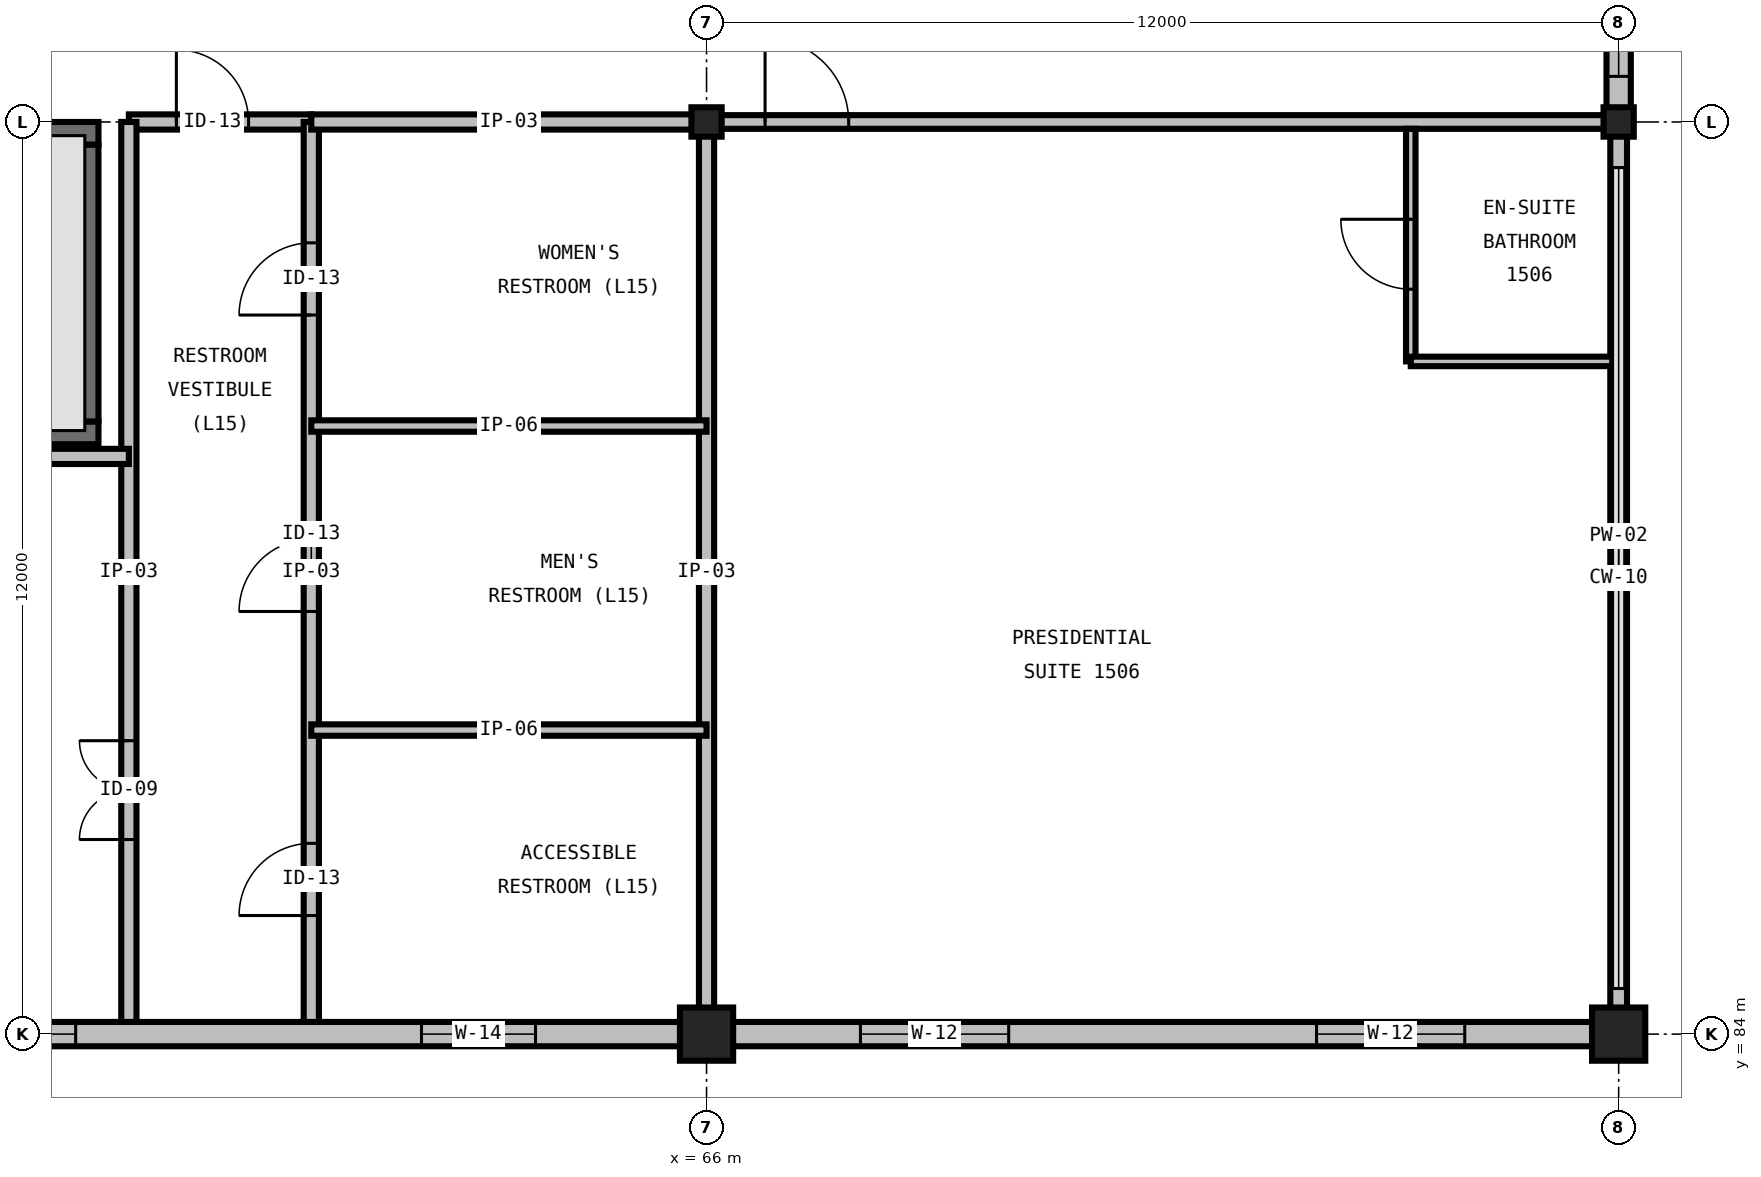
"""IFC4 building model, lengths in metres.
Left out: names, types, materials, properties, quantities, classifications, styles, units other than length and angle.
Written with IfcOpenShell. Run it as: python <this file> out.ifc"""

import sys

from ifc_helpers import new_model, si_unit, direction, frame, frame_2d, origin, origin_2d, place, context, subcontext, project, spatial, rectangle, i_section, extrude, element, fill, save


model = new_model("IFC4")
c1 = context("Model", 3, precision=1e-05, world=origin(), true_north=direction((0.0, 1.0)))
c2 = subcontext(c1, "Body", "Model", "MODEL_VIEW")
j1 = project(units=[si_unit("LENGTHUNIT", "METRE"), si_unit("PLANEANGLEUNIT", "RADIAN")], contexts=[c1])
p1 = place(None, origin())
s1 = spatial("IfcSite", under=j1, at=p1, CompositionType="ELEMENT")
p2 = place(p1, origin())
s2 = spatial("IfcBuilding", under=s1, at=p2, CompositionType="ELEMENT")
p3 = place(p2, frame((0.0, 0.0, 63.6)))
s3 = spatial("IfcBuildingStorey", under=s2, at=p3, CompositionType="ELEMENT", Elevation=63.6)
p4 = place(p3, frame((66.0, 84.0, 0.0), z_axis=(0.0, 0.0, 1.0), x_axis=(1.0, 0.0, 0.0)))
e1 = element("IfcColumn", 1, at=p4, inside=s3, PredefinedType="COLUMN", context=c2, shape_type="SweptSolid", body=[
    extrude(rectangle(XDim=0.7, YDim=0.7, at=origin_2d()), origin(), (0.0, 0.0, 1.0), 3.6),
])
p5 = place(p3, frame((66.0, 96.0, 0.0), z_axis=(0.0, 0.0, 1.0), x_axis=(1.0, 0.0, 0.0)))
e2 = element("IfcColumn", 2, at=p5, inside=s3, PredefinedType="COLUMN", context=c2, shape_type="SweptSolid", body=[
    extrude(i_section(OverallWidth=0.398, OverallDepth=0.387, WebThickness=0.021, FlangeThickness=0.033, FilletRadius=0.031, at=origin_2d()), origin(), (0.0, 0.0, 1.0), 3.6),
])
p6 = place(p3, frame((78.0, 84.0, 0.0), z_axis=(0.0, 0.0, 1.0), x_axis=(1.0, 0.0, 0.0)))
e3 = element("IfcColumn", 3, at=p6, inside=s3, PredefinedType="COLUMN", context=c2, shape_type="SweptSolid", body=[
    extrude(rectangle(XDim=0.7, YDim=0.7, at=origin_2d()), origin(), (0.0, 0.0, 1.0), 3.6),
])
p7 = place(p3, frame((78.0, 96.0, 0.0), z_axis=(0.0, 0.0, 1.0), x_axis=(1.0, 0.0, 0.0)))
e4 = element("IfcColumn", 4, at=p7, inside=s3, PredefinedType="COLUMN", context=c2, shape_type="SweptSolid", body=[
    extrude(i_section(OverallWidth=0.398, OverallDepth=0.387, WebThickness=0.021, FlangeThickness=0.033, FilletRadius=0.031, at=origin_2d()), origin(), (0.0, 0.0, 1.0), 3.6),
])
p8 = place(p3, frame((48.2, 91.91, 0.0), z_axis=(0.0, 0.0, 1.0), x_axis=(1.0, 0.0, 0.0)))
e5 = element("IfcWall", 5, at=p8, inside=s3, PredefinedType="SHEAR", context=c2, shape_type="SweptSolid", body=[
    extrude(rectangle(XDim=9.8, YDim=0.3, at=frame_2d((4.9, 0.0))), origin(), (0.0, 0.0, 1.0), 3.6),
])
p9 = place(p3, frame((58.0, 95.85, 0.0), z_axis=(0.0, 0.0, 1.0), x_axis=(-1.0, 0.0, 0.0)))
e6 = element("IfcWall", 6, at=p9, inside=s3, PredefinedType="SHEAR", context=c2, shape_type="SweptSolid", body=[
    extrude(rectangle(XDim=9.8, YDim=0.3, at=frame_2d((4.9, 0.0))), origin(), (0.0, 0.0, 1.0), 3.6),
])
p10 = place(p9, frame((8.25, 0.0, 0.0)))
e7 = element("IfcOpeningElement", 7, at=p10, cuts=e6, PredefinedType="OPENING", context=c2, shape_type="SweptSolid", body=[
    extrude(rectangle(XDim=1.1, YDim=2.2, at=frame_2d((0.55, 1.1))), frame((0.0, 0.165, 0.0), z_axis=(0.0, -1.0, 0.0), x_axis=(1.0, 0.0, 0.0)), (0.0, 0.0, 1.0), 0.33),
])
p11 = place(p3, frame((57.85, 92.06, 0.0), z_axis=(0.0, 0.0, 1.0), x_axis=(0.0, 1.0, 0.0)))
e8 = element("IfcWall", 8, at=p11, inside=s3, PredefinedType="SHEAR", context=c2, shape_type="SweptSolid", body=[
    extrude(rectangle(XDim=3.64, YDim=0.3, at=frame_2d((1.82, 0.0))), origin(), (0.0, 0.0, 1.0), 3.6),
])
p12 = place(p3, frame((54.0, 84.0, 0.0), z_axis=(0.0, 0.0, 1.0), x_axis=(1.0, 0.0, 0.0)))
e9 = element("IfcWall", 9, at=p12, inside=s3, PredefinedType="STANDARD", context=c2, shape_type="SweptSolid", body=[
    extrude(rectangle(XDim=12.0, YDim=0.32, at=frame_2d((6.0, 0.0))), origin(), (0.0, 0.0, 1.0), 2.536),
])
p13 = place(p12, frame((2.3, 0.0, 1.0)))
e10 = element("IfcOpeningElement", 10, at=p13, cuts=e9, PredefinedType="OPENING", context=c2, shape_type="SweptSolid", body=[
    extrude(rectangle(XDim=1.4, YDim=1.4, at=frame_2d((0.7, 0.7))), frame((0.0, 0.175, 0.0), z_axis=(0.0, -1.0, 0.0), x_axis=(1.0, 0.0, 0.0)), (0.0, 0.0, 1.0), 0.35),
])
p14 = place(p12, frame((8.25, 0.0, 1.0)))
e11 = element("IfcOpeningElement", 11, at=p14, cuts=e9, PredefinedType="OPENING", context=c2, shape_type="SweptSolid", body=[
    extrude(rectangle(XDim=1.5, YDim=1.35, at=frame_2d((0.75, 0.675))), frame((0.0, 0.175, 0.0), z_axis=(0.0, -1.0, 0.0), x_axis=(1.0, 0.0, 0.0)), (0.0, 0.0, 1.0), 0.35),
])
p15 = place(p3, frame((66.0, 84.0, 0.0), z_axis=(0.0, 0.0, 1.0), x_axis=(1.0, 0.0, 0.0)))
e12 = element("IfcWall", 12, at=p15, inside=s3, PredefinedType="STANDARD", context=c2, shape_type="SweptSolid", body=[
    extrude(rectangle(XDim=12.0, YDim=0.32, at=frame_2d((6.0, 0.0))), origin(), (0.0, 0.0, 1.0), 2.536),
])
p16 = place(p15, frame((2.025, 0.0, 0.65)))
e13 = element("IfcOpeningElement", 13, at=p16, cuts=e12, PredefinedType="OPENING", context=c2, shape_type="SweptSolid", body=[
    extrude(rectangle(XDim=1.95, YDim=1.55, at=frame_2d((0.975, 0.775))), frame((0.0, 0.175, 0.0), z_axis=(0.0, -1.0, 0.0), x_axis=(1.0, 0.0, 0.0)), (0.0, 0.0, 1.0), 0.35),
])
p17 = place(p15, frame((8.025, 0.0, 0.65)))
e14 = element("IfcOpeningElement", 14, at=p17, cuts=e12, PredefinedType="OPENING", context=c2, shape_type="SweptSolid", body=[
    extrude(rectangle(XDim=1.95, YDim=1.55, at=frame_2d((0.975, 0.775))), frame((0.0, 0.175, 0.0), z_axis=(0.0, -1.0, 0.0), x_axis=(1.0, 0.0, 0.0)), (0.0, 0.0, 1.0), 0.35),
])
p18 = place(p3, frame((78.0, 84.0, 0.0), z_axis=(0.0, 0.0, 1.0), x_axis=(0.0, 1.0, 0.0)))
e15 = element("IfcWall", 15, at=p18, inside=s3, PredefinedType="PARAPET", context=c2, shape_type="SweptSolid", body=[
    extrude(rectangle(XDim=12.0, YDim=0.22, at=frame_2d((6.0, 0.0))), origin(), (0.0, 0.0, 1.0), 0.2),
])
p19 = place(p3, frame((78.0, 96.0, 0.0), z_axis=(0.0, 0.0, 1.0), x_axis=(0.0, 1.0, 0.0)))
e16 = element("IfcWall", 16, at=p19, inside=s3, PredefinedType="STANDARD", context=c2, shape_type="SweptSolid", body=[
    extrude(rectangle(XDim=9.0, YDim=0.32, at=frame_2d((4.5, 0.0))), origin(), (0.0, 0.0, 1.0), 2.981),
])
p20 = place(p19, frame((0.6, 0.0, 0.85)))
e17 = element("IfcOpeningElement", 17, at=p20, cuts=e16, PredefinedType="OPENING", context=c2, shape_type="SweptSolid", body=[
    extrude(rectangle(XDim=1.8, YDim=1.5, at=frame_2d((0.9, 0.75))), frame((0.0, 0.175, 0.0), z_axis=(0.0, -1.0, 0.0), x_axis=(1.0, 0.0, 0.0)), (0.0, 0.0, 1.0), 0.35),
])
p21 = place(p3, frame((58.4, 96.0, 0.0), z_axis=(0.0, 0.0, 1.0), x_axis=(1.0, 0.0, 0.0)))
e18 = element("IfcWall", 18, at=p21, inside=s3, PredefinedType="PARTITIONING", context=c2, shape_type="SweptSolid", body=[
    extrude(rectangle(XDim=2.4, YDim=0.2, at=frame_2d((1.2, 0.0))), origin(), (0.0, 0.0, 1.0), 2.359),
])
p22 = place(p21, frame((0.625, 0.0, 0.0)))
e19 = element("IfcOpeningElement", 19, at=p22, cuts=e18, PredefinedType="OPENING", context=c2, shape_type="SweptSolid", body=[
    extrude(rectangle(XDim=0.95, YDim=2.15, at=frame_2d((0.475, 1.075))), frame((0.0, 0.115, 0.0), z_axis=(0.0, -1.0, 0.0), x_axis=(1.0, 0.0, 0.0)), (0.0, 0.0, 1.0), 0.23),
])
p23 = place(p3, frame((58.4, 84.16, 0.0), z_axis=(0.0, 0.0, 1.0), x_axis=(0.0, 1.0, 0.0)))
e20 = element("IfcWall", 20, at=p23, inside=s3, PredefinedType="PARTITIONING", context=c2, shape_type="SweptSolid", body=[
    extrude(rectangle(XDim=11.84, YDim=0.2, at=frame_2d((5.92, 0.0))), origin(), (0.0, 0.0, 1.0), 3.29),
])
p24 = place(p23, frame((2.4, 0.0, 0.0)))
e21 = element("IfcOpeningElement", 21, at=p24, cuts=e20, PredefinedType="OPENING", context=c2, shape_type="SweptSolid", body=[
    extrude(rectangle(XDim=1.3, YDim=2.2, at=frame_2d((0.65, 1.1))), frame((0.0, 0.115, 0.0), z_axis=(0.0, -1.0, 0.0), x_axis=(1.0, 0.0, 0.0)), (0.0, 0.0, 1.0), 0.23),
])
p25 = place(p3, frame((60.8, 84.16, 0.0), z_axis=(0.0, 0.0, 1.0), x_axis=(0.0, 1.0, 0.0)))
e22 = element("IfcWall", 22, at=p25, inside=s3, PredefinedType="PARTITIONING", context=c2, shape_type="SweptSolid", body=[
    extrude(rectangle(XDim=11.84, YDim=0.2, at=frame_2d((5.92, 0.0))), origin(), (0.0, 0.0, 1.0), 3.29),
])
p26 = place(p25, frame((1.4, 0.0, 0.0)))
e23 = element("IfcOpeningElement", 23, at=p26, cuts=e22, PredefinedType="OPENING", context=c2, shape_type="SweptSolid", body=[
    extrude(rectangle(XDim=0.95, YDim=2.15, at=frame_2d((0.475, 1.075))), frame((0.0, 0.115, 0.0), z_axis=(0.0, -1.0, 0.0), x_axis=(1.0, 0.0, 0.0)), (0.0, 0.0, 1.0), 0.23),
])
p27 = place(p25, frame((5.4, 0.0, 0.0)))
e24 = element("IfcOpeningElement", 24, at=p27, cuts=e22, PredefinedType="OPENING", context=c2, shape_type="SweptSolid", body=[
    extrude(rectangle(XDim=0.95, YDim=2.15, at=frame_2d((0.475, 1.075))), frame((0.0, 0.115, 0.0), z_axis=(0.0, -1.0, 0.0), x_axis=(1.0, 0.0, 0.0)), (0.0, 0.0, 1.0), 0.23),
])
p28 = place(p25, frame((9.3, 0.0, 0.0)))
e25 = element("IfcOpeningElement", 25, at=p28, cuts=e22, PredefinedType="OPENING", context=c2, shape_type="SweptSolid", body=[
    extrude(rectangle(XDim=0.95, YDim=2.15, at=frame_2d((0.475, 1.075))), frame((0.0, 0.115, 0.0), z_axis=(0.0, -1.0, 0.0), x_axis=(1.0, 0.0, 0.0)), (0.0, 0.0, 1.0), 0.23),
])
p29 = place(p3, frame((66.0, 84.16, 0.0), z_axis=(0.0, 0.0, 1.0), x_axis=(0.0, 1.0, 0.0)))
e26 = element("IfcWall", 26, at=p29, inside=s3, PredefinedType="PARTITIONING", context=c2, shape_type="SweptSolid", body=[
    extrude(rectangle(XDim=11.84, YDim=0.2, at=frame_2d((5.92, 0.0))), origin(), (0.0, 0.0, 1.0), 2.59),
])
p30 = place(p3, frame((60.8, 96.0, 0.0), z_axis=(0.0, 0.0, 1.0), x_axis=(1.0, 0.0, 0.0)))
e27 = element("IfcWall", 27, at=p30, inside=s3, PredefinedType="PARTITIONING", context=c2, shape_type="SweptSolid", body=[
    extrude(rectangle(XDim=5.2, YDim=0.2, at=frame_2d((2.6, 0.0))), origin(), (0.0, 0.0, 1.0), 2.359),
])
for number, where, z_axis, x_axis in (
    (28, (60.8, 88.0, 0.0), (0.0, 0.0, 1.0), (1.0, 0.0, 0.0)),
    (29, (60.8, 92.0, 0.0), (0.0, 0.0, 1.0), (1.0, 0.0, 0.0)),
):
    element("IfcWall", number, at=place(p3, frame(where, z_axis=z_axis, x_axis=x_axis)), inside=s3, PredefinedType="PARTITIONING", context=c2, shape_type="SweptSolid", body=[
        extrude(rectangle(XDim=5.2, YDim=0.15, at=frame_2d((2.6, 0.0))), origin(), (0.0, 0.0, 1.0), 3.29),
    ])
p31 = place(p3, frame((48.0, 91.6, 0.0), z_axis=(0.0, 0.0, 1.0), x_axis=(1.0, 0.0, 0.0)))
e30 = element("IfcWall", 30, at=p31, inside=s3, PredefinedType="PARTITIONING", context=c2, shape_type="SweptSolid", body=[
    extrude(rectangle(XDim=10.4, YDim=0.2, at=frame_2d((5.2, 0.0))), origin(), (0.0, 0.0, 1.0), 3.29),
])
p32 = place(p3, frame((66.0, 96.0, 0.0), z_axis=(0.0, 0.0, 1.0), x_axis=(1.0, 0.0, 0.0)))
e31 = element("IfcWall", 31, at=p32, inside=s3, PredefinedType="PARTITIONING", context=c2, shape_type="SweptSolid", body=[
    extrude(rectangle(XDim=11.915, YDim=0.18, at=frame_2d((5.957, 0.0))), origin(), (0.0, 0.0, 1.0), 2.664),
])
p33 = place(p32, frame((0.77, 0.0, 0.0)))
e32 = element("IfcOpeningElement", 32, at=p33, cuts=e31, PredefinedType="OPENING", context=c2, shape_type="SweptSolid", body=[
    extrude(rectangle(XDim=1.1, YDim=2.2, at=frame_2d((0.55, 1.1))), frame((0.0, 0.105, 0.0), z_axis=(0.0, -1.0, 0.0), x_axis=(1.0, 0.0, 0.0)), (0.0, 0.0, 1.0), 0.21),
])
p34 = place(p3, frame((75.265, 92.85, 0.0), z_axis=(0.0, 0.0, 1.0), x_axis=(0.0, 1.0, 0.0)))
e33 = element("IfcWall", 33, at=p34, inside=s3, PredefinedType="PARTITIONING", context=c2, shape_type="SweptSolid", body=[
    extrude(rectangle(XDim=3.06, YDim=0.125, at=frame_2d((1.53, 0.0))), origin(), (0.0, 0.0, 1.0), 3.29),
])
p35 = place(p34, frame((0.95, 0.0, 0.0)))
e34 = element("IfcOpeningElement", 34, at=p35, cuts=e33, PredefinedType="OPENING", context=c2, shape_type="SweptSolid", body=[
    extrude(rectangle(XDim=0.92, YDim=2.1, at=frame_2d((0.46, 1.05))), frame((0.0, 0.077, 0.0), z_axis=(0.0, -1.0, 0.0), x_axis=(1.0, 0.0, 0.0)), (0.0, 0.0, 1.0), 0.155),
])
p36 = place(p3, frame((75.265, 92.85, 0.0), z_axis=(0.0, 0.0, 1.0), x_axis=(1.0, 0.0, 0.0)))
e35 = element("IfcWall", 35, at=p36, inside=s3, PredefinedType="PARTITIONING", context=c2, shape_type="SweptSolid", body=[
    extrude(rectangle(XDim=2.65, YDim=0.125, at=frame_2d((1.325, 0.0))), origin(), (0.0, 0.0, 1.0), 3.29),
])
p37 = place(p13, origin())
e36 = element("IfcWindow", 36, at=p37, inside=s3, PartitioningType="SINGLE_PANEL", PredefinedType="WINDOW", context=c2, shape_type="SweptSolid", body=[
    extrude(rectangle(XDim=1.4, YDim=1.4, at=frame_2d((0.7, 0.7))), frame((0.0, 0.03, 0.0), z_axis=(0.0, -1.0, 0.0), x_axis=(1.0, 0.0, 0.0)), (0.0, 0.0, 1.0), 0.06),
])
fill(e10, e36)
p38 = place(p14, origin())
e37 = element("IfcWindow", 37, at=p38, inside=s3, PartitioningType="SINGLE_PANEL", PredefinedType="WINDOW", context=c2, shape_type="SweptSolid", body=[
    extrude(rectangle(XDim=1.5, YDim=1.35, at=frame_2d((0.75, 0.675))), frame((0.0, 0.03, 0.0), z_axis=(0.0, -1.0, 0.0), x_axis=(1.0, 0.0, 0.0)), (0.0, 0.0, 1.0), 0.06),
])
fill(e11, e37)
p39 = place(p16, origin())
e38 = element("IfcWindow", 38, at=p39, inside=s3, PartitioningType="DOUBLE_PANEL_VERTICAL", PredefinedType="WINDOW", context=c2, shape_type="SweptSolid", body=[
    extrude(rectangle(XDim=1.95, YDim=1.55, at=frame_2d((0.975, 0.775))), frame((0.0, 0.03, 0.0), z_axis=(0.0, -1.0, 0.0), x_axis=(1.0, 0.0, 0.0)), (0.0, 0.0, 1.0), 0.06),
])
fill(e13, e38)
p40 = place(p17, origin())
e39 = element("IfcWindow", 39, at=p40, inside=s3, PartitioningType="DOUBLE_PANEL_VERTICAL", PredefinedType="WINDOW", context=c2, shape_type="SweptSolid", body=[
    extrude(rectangle(XDim=1.95, YDim=1.55, at=frame_2d((0.975, 0.775))), frame((0.0, 0.03, 0.0), z_axis=(0.0, -1.0, 0.0), x_axis=(1.0, 0.0, 0.0)), (0.0, 0.0, 1.0), 0.06),
])
fill(e14, e39)
p41 = place(p20, origin())
e40 = element("IfcWindow", 40, at=p41, inside=s3, PartitioningType="SINGLE_PANEL", PredefinedType="WINDOW", context=c2, shape_type="SweptSolid", body=[
    extrude(rectangle(XDim=1.8, YDim=1.5, at=frame_2d((0.9, 0.75))), frame((0.0, 0.03, 0.0), z_axis=(0.0, -1.0, 0.0), x_axis=(1.0, 0.0, 0.0)), (0.0, 0.0, 1.0), 0.06),
])
fill(e17, e40)
p42 = place(p22, origin())
e41 = element("IfcDoor", 41, at=p42, inside=s3, OperationType="SINGLE_SWING_LEFT", PredefinedType="DOOR", context=c2, shape_type="SweptSolid", body=[
    extrude(rectangle(XDim=0.95, YDim=2.15, at=frame_2d((0.475, 1.075))), frame((0.0, 0.025, 0.0), z_axis=(0.0, -1.0, 0.0), x_axis=(1.0, 0.0, 0.0)), (0.0, 0.0, 1.0), 0.05),
])
fill(e19, e41)
p43 = place(p24, origin())
e42 = element("IfcDoor", 42, at=p43, inside=s3, OperationType="DOUBLE_DOOR_SINGLE_SWING", PredefinedType="DOOR", context=c2, shape_type="SweptSolid", body=[
    extrude(rectangle(XDim=1.3, YDim=2.2, at=frame_2d((0.65, 1.1))), frame((0.0, 0.025, 0.0), z_axis=(0.0, -1.0, 0.0), x_axis=(1.0, 0.0, 0.0)), (0.0, 0.0, 1.0), 0.05),
])
fill(e21, e42)
p44 = place(p26, origin())
e43 = element("IfcDoor", 43, at=p44, inside=s3, OperationType="SINGLE_SWING_LEFT", PredefinedType="DOOR", context=c2, shape_type="SweptSolid", body=[
    extrude(rectangle(XDim=0.95, YDim=2.15, at=frame_2d((0.475, 1.075))), frame((0.0, 0.025, 0.0), z_axis=(0.0, -1.0, 0.0), x_axis=(1.0, 0.0, 0.0)), (0.0, 0.0, 1.0), 0.05),
])
fill(e23, e43)
p45 = place(p27, origin())
e44 = element("IfcDoor", 44, at=p45, inside=s3, OperationType="SINGLE_SWING_LEFT", PredefinedType="DOOR", context=c2, shape_type="SweptSolid", body=[
    extrude(rectangle(XDim=0.95, YDim=2.15, at=frame_2d((0.475, 1.075))), frame((0.0, 0.025, 0.0), z_axis=(0.0, -1.0, 0.0), x_axis=(1.0, 0.0, 0.0)), (0.0, 0.0, 1.0), 0.05),
])
fill(e24, e44)
p46 = place(p28, origin())
e45 = element("IfcDoor", 45, at=p46, inside=s3, OperationType="SINGLE_SWING_LEFT", PredefinedType="DOOR", context=c2, shape_type="SweptSolid", body=[
    extrude(rectangle(XDim=0.95, YDim=2.15, at=frame_2d((0.475, 1.075))), frame((0.0, 0.025, 0.0), z_axis=(0.0, -1.0, 0.0), x_axis=(1.0, 0.0, 0.0)), (0.0, 0.0, 1.0), 0.05),
])
fill(e25, e45)
p47 = place(p33, origin())
e46 = element("IfcDoor", 46, at=p47, inside=s3, OperationType="SINGLE_SWING_LEFT", PredefinedType="DOOR", context=c2, shape_type="SweptSolid", body=[
    extrude(rectangle(XDim=1.1, YDim=2.2, at=frame_2d((0.55, 1.1))), frame((0.0, 0.025, 0.0), z_axis=(0.0, -1.0, 0.0), x_axis=(1.0, 0.0, 0.0)), (0.0, 0.0, 1.0), 0.05),
])
fill(e32, e46)
p48 = place(p35, origin())
e47 = element("IfcDoor", 47, at=p48, inside=s3, OperationType="SINGLE_SWING_RIGHT", PredefinedType="DOOR", context=c2, shape_type="SweptSolid", body=[
    extrude(rectangle(XDim=0.92, YDim=2.1, at=frame_2d((0.46, 1.05))), frame((0.0, 0.025, 0.0), z_axis=(0.0, -1.0, 0.0), x_axis=(1.0, 0.0, 0.0)), (0.0, 0.0, 1.0), 0.05),
])
fill(e34, e47)
save(model, sys.argv[1])
